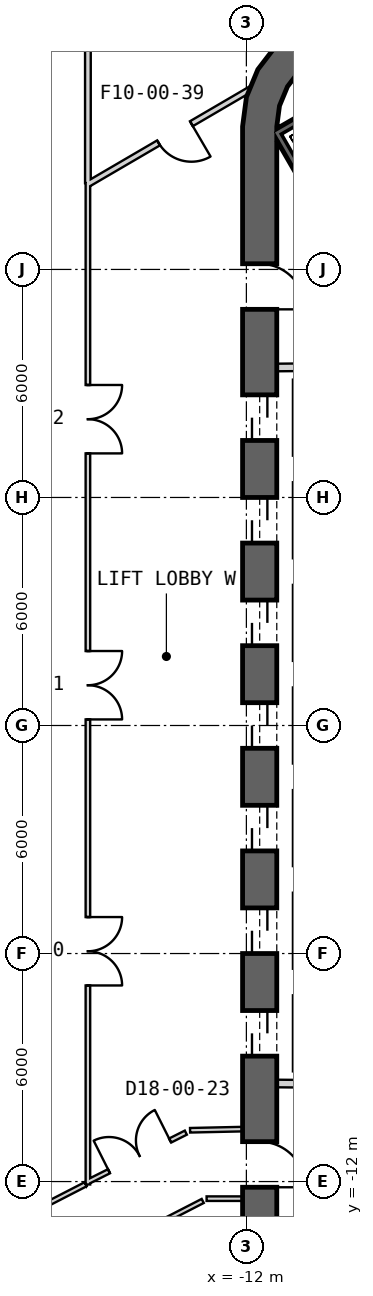
"""IFC4 building model, lengths in metres.
Left out: names, types, materials, properties, quantities, classifications, styles, units other than length and angle.
Written with IfcOpenShell. Run it as: python <this file> out.ifc"""

import sys

from ifc_helpers import new_model, si_unit, direction, frame, frame_2d, origin, place, context, subcontext, project, spatial, polyline, rectangle, outline, extrude, element, fill, save


model = new_model("IFC4")
c1 = context("Model", 3, precision=1e-05, world=origin(), true_north=direction((0.0, 1.0)))
c2 = subcontext(c1, "Body", "Model", "MODEL_VIEW")
j1 = project(units=[si_unit("LENGTHUNIT", "METRE"), si_unit("PLANEANGLEUNIT", "RADIAN")], contexts=[c1])
p1 = place(None, origin())
s1 = spatial("IfcSite", under=j1, at=p1, CompositionType="ELEMENT")
p2 = place(p1, origin())
s2 = spatial("IfcBuilding", under=s1, at=p2, CompositionType="ELEMENT")
p3 = place(p2, origin())
s3 = spatial("IfcBuildingStorey", under=s2, at=p3, CompositionType="ELEMENT", Elevation=0.0)
p4 = place(p3, frame((-11.65, 15.762, 0.0), z_axis=(0.0, 0.0, 1.0), x_axis=(0.0, -1.0, 0.0)))
e1 = element("IfcWall", 1, at=p4, inside=s3, PredefinedType="SHEAR", context=c2, shape_type="SweptSolid", body=[
    extrude(rectangle(XDim=31.523, YDim=0.9, at=frame_2d((15.762, 0.0))), origin(), (0.0, 0.0, 1.0), 9.0),
])
p5 = place(p4, frame((7.062, 0.0, 0.0)))
e2 = element("IfcOpeningElement", 2, at=p5, cuts=e1, PredefinedType="OPENING", context=c2, shape_type="SweptSolid", body=[
    extrude(rectangle(XDim=1.2, YDim=2.4, at=frame_2d((0.6, 1.2))), frame((0.0, 0.46, 0.0), z_axis=(0.0, -1.0, 0.0), x_axis=(1.0, 0.0, 0.0)), (0.0, 0.0, 1.0), 0.92),
])
p6 = place(p4, frame((9.762, 0.0, 0.0)))
e3 = element("IfcOpeningElement", 3, at=p6, cuts=e1, PredefinedType="OPENING", context=c2, shape_type="SweptSolid", body=[
    extrude(rectangle(XDim=1.2, YDim=2.4, at=frame_2d((0.6, 1.2))), frame((0.0, 0.46, 0.0), z_axis=(0.0, -1.0, 0.0), x_axis=(1.0, 0.0, 0.0)), (0.0, 0.0, 1.0), 0.92),
])
p7 = place(p4, frame((12.462, 0.0, 0.0)))
e4 = element("IfcOpeningElement", 4, at=p7, cuts=e1, PredefinedType="OPENING", context=c2, shape_type="SweptSolid", body=[
    extrude(rectangle(XDim=1.2, YDim=2.4, at=frame_2d((0.6, 1.2))), frame((0.0, 0.46, 0.0), z_axis=(0.0, -1.0, 0.0), x_axis=(1.0, 0.0, 0.0)), (0.0, 0.0, 1.0), 0.92),
])
p8 = place(p4, frame((15.162, 0.0, 0.0)))
e5 = element("IfcOpeningElement", 5, at=p8, cuts=e1, PredefinedType="OPENING", context=c2, shape_type="SweptSolid", body=[
    extrude(rectangle(XDim=1.2, YDim=2.4, at=frame_2d((0.6, 1.2))), frame((0.0, 0.46, 0.0), z_axis=(0.0, -1.0, 0.0), x_axis=(1.0, 0.0, 0.0)), (0.0, 0.0, 1.0), 0.92),
])
p9 = place(p4, frame((17.862, 0.0, 0.0)))
e6 = element("IfcOpeningElement", 6, at=p9, cuts=e1, PredefinedType="OPENING", context=c2, shape_type="SweptSolid", body=[
    extrude(rectangle(XDim=1.2, YDim=2.4, at=frame_2d((0.6, 1.2))), frame((0.0, 0.46, 0.0), z_axis=(0.0, -1.0, 0.0), x_axis=(1.0, 0.0, 0.0)), (0.0, 0.0, 1.0), 0.92),
])
p10 = place(p4, frame((20.562, 0.0, 0.0)))
e7 = element("IfcOpeningElement", 7, at=p10, cuts=e1, PredefinedType="OPENING", context=c2, shape_type="SweptSolid", body=[
    extrude(rectangle(XDim=1.2, YDim=2.4, at=frame_2d((0.6, 1.2))), frame((0.0, 0.46, 0.0), z_axis=(0.0, -1.0, 0.0), x_axis=(1.0, 0.0, 0.0)), (0.0, 0.0, 1.0), 0.92),
])
p11 = place(p4, frame((23.262, 0.0, 0.0)))
e8 = element("IfcOpeningElement", 8, at=p11, cuts=e1, PredefinedType="OPENING", context=c2, shape_type="SweptSolid", body=[
    extrude(rectangle(XDim=1.2, YDim=2.4, at=frame_2d((0.6, 1.2))), frame((0.0, 0.46, 0.0), z_axis=(0.0, -1.0, 0.0), x_axis=(1.0, 0.0, 0.0)), (0.0, 0.0, 1.0), 0.92),
])
p12 = place(p4, frame((3.612, 0.0, 0.0)))
e9 = element("IfcOpeningElement", 9, at=p12, cuts=e1, PredefinedType="OPENING", context=c2, shape_type="SweptSolid", body=[
    extrude(rectangle(XDim=1.2, YDim=2.4, at=frame_2d((0.6, 1.2))), frame((0.0, 0.46, 0.0), z_axis=(0.0, -1.0, 0.0), x_axis=(1.0, 0.0, 0.0)), (0.0, 0.0, 1.0), 0.92),
])
p13 = place(p4, frame((26.712, 0.0, 0.0)))
e10 = element("IfcOpeningElement", 10, at=p13, cuts=e1, PredefinedType="OPENING", context=c2, shape_type="SweptSolid", body=[
    extrude(rectangle(XDim=1.2, YDim=2.4, at=frame_2d((0.6, 1.2))), frame((0.0, 0.46, 0.0), z_axis=(0.0, -1.0, 0.0), x_axis=(1.0, 0.0, 0.0)), (0.0, 0.0, 1.0), 0.92),
])
p14 = place(p3, origin())
e11 = element("IfcWall", 11, at=p14, inside=s3, PredefinedType="SHEAR", context=c2, shape_type="SweptSolid", body=[
    extrude(outline(polyline([(-7.6, 18.36), (-8.323, 18.659), (-9.1, 18.762), (-9.876, 18.659), (-10.6, 18.36), (-11.221, 17.883), (-11.698, 17.262), (-11.998, 16.538), (-12.1, 15.762), (-11.2, 15.762), (-11.128, 16.305), (-10.919, 16.812), (-10.585, 17.247), (-10.15, 17.58), (-9.644, 17.79), (-9.1, 17.862), (-8.556, 17.79), (-8.05, 17.58), (-7.6, 18.36)])), origin(), (0.0, 0.0, 1.0), 9.0),
])
p15 = place(p3, frame((-11.2, 9.42, 0.0), z_axis=(0.0, 0.0, 1.0), x_axis=(0.999957167047, 0.009255488683, 0.0)))
e12 = element("IfcWall", 12, at=p15, inside=s3, PredefinedType="PLUMBINGWALL", context=c2, shape_type="SweptSolid", body=[
    extrude(rectangle(XDim=3.35, YDim=0.2, at=frame_2d((1.675, 0.0))), origin(), (0.0, 0.0, 1.0), 8.7),
])
p16 = place(p3, frame((-8.05, -9.449, 0.0), z_axis=(0.0, 0.0, 1.0), x_axis=(-0.999957467379, 0.009222983926, 0.0)))
e13 = element("IfcWall", 13, at=p16, inside=s3, PredefinedType="PLUMBINGWALL", context=c2, shape_type="SweptSolid", body=[
    extrude(rectangle(XDim=3.15, YDim=0.2, at=frame_2d((1.575, 0.0))), origin(), (0.0, 0.0, 1.0), 8.7),
])
p17 = place(p3, frame((-11.245, 15.678, -0.4), z_axis=(0.0, 0.0, 1.0), x_axis=(0.499977274689, -0.866038523851, 0.0)))
e14 = element("IfcWall", 14, at=p17, inside=s3, PredefinedType="SHEAR", context=c2, shape_type="SweptSolid", body=[
    extrude(rectangle(XDim=8.1, YDim=0.2, at=frame_2d((4.05, 0.0))), origin(), (0.0, 0.0, 1.0), 9.1),
])
p18 = place(p3, frame((-7.818, 17.541, -0.4), z_axis=(0.0, 0.0, 1.0), x_axis=(-0.866044365799, -0.499967155389, 0.0)))
e15 = element("IfcWall", 15, at=p18, inside=s3, PredefinedType="SHEAR", context=c2, shape_type="SweptSolid", body=[
    extrude(rectangle(XDim=3.8, YDim=0.2, at=frame_2d((1.9, 0.0))), origin(), (0.0, 0.0, 1.0), 9.1),
])
p19 = place(p3, frame((-7.196, -8.663, -0.4), z_axis=(0.0, 0.0, 1.0), x_axis=(-0.499997992926, -0.866026562566, 0.0)))
e16 = element("IfcWall", 16, at=p19, inside=s3, PredefinedType="SHEAR", context=c2, shape_type="SweptSolid", body=[
    extrude(rectangle(XDim=7.9, YDim=0.2, at=frame_2d((3.95, 0.0))), origin(), (0.0, 0.0, 1.0), 9.1),
])
p20 = place(p3, frame((-11.74, 16.832, 0.0), z_axis=(0.0, 0.0, 1.0), x_axis=(-0.863501067027, -0.504347010741, 0.0)))
e17 = element("IfcWall", 17, at=p20, inside=s3, PredefinedType="PLUMBINGWALL", context=c2, shape_type="SweptSolid", body=[
    extrude(rectangle(XDim=5.166, YDim=0.15, at=frame_2d((2.583, 0.0))), origin(), (0.0, 0.0, 1.0), 7.78),
])
p21 = place(p20, frame((1.977, 0.0, 0.0)))
e18 = element("IfcOpeningElement", 18, at=p21, cuts=e17, PredefinedType="OPENING", context=c2, shape_type="SweptSolid", body=[
    extrude(rectangle(XDim=1.0, YDim=2.1, at=frame_2d((0.5, 1.05))), frame((0.0, 0.085, 0.0), z_axis=(0.0, -1.0, 0.0), x_axis=(1.0, 0.0, 0.0)), (0.0, 0.0, 1.0), 0.17),
])
p22 = place(p3, frame((-13.481, -10.65, 0.0), z_axis=(0.0, 0.0, 1.0), x_axis=(0.999759933767, 0.021910610072, 0.0)))
e19 = element("IfcWall", 19, at=p22, inside=s3, PredefinedType="PARTITIONING", context=c2, shape_type="SweptSolid", body=[
    extrude(rectangle(XDim=1.382, YDim=0.12, at=frame_2d((0.691, 0.0))), origin(), (0.0, 0.0, 1.0), 8.7),
])
p23 = place(p3, frame((-16.2, -12.022, 0.0), z_axis=(0.0, 0.0, 1.0), x_axis=(0.893622341214, 0.448819686826, 0.0)))
e20 = element("IfcWall", 20, at=p23, inside=s3, PredefinedType="PARTITIONING", context=c2, shape_type="SweptSolid", body=[
    extrude(rectangle(XDim=2.917, YDim=0.12, at=frame_2d((1.458, 0.0))), origin(), (0.0, 0.0, 1.0), 8.7),
])
p24 = place(p23, frame((0.655, 0.0, 0.0)))
e21 = element("IfcOpeningElement", 21, at=p24, cuts=e20, PredefinedType="OPENING", context=c2, shape_type="SweptSolid", body=[
    extrude(rectangle(XDim=1.8, YDim=2.1, at=frame_2d((0.9, 1.05))), frame((0.0, 0.07, 0.0), z_axis=(0.0, -1.0, 0.0), x_axis=(1.0, 0.0, 0.0)), (0.0, 0.0, 1.0), 0.14),
])
p25 = place(p3, frame((-16.17, 14.273, 0.0), z_axis=(0.0, 0.0, 1.0), x_axis=(0.0, -1.0, 0.0)))
e22 = element("IfcWall", 22, at=p25, inside=s3, PredefinedType="PARTITIONING", context=c2, shape_type="SweptSolid", body=[
    extrude(rectangle(XDim=26.35, YDim=0.12, at=frame_2d((13.175, 0.0))), origin(), (0.0, 0.0, 1.0), 8.08),
])
p26 = place(p25, frame((19.314, 0.0, 0.0)))
e23 = element("IfcOpeningElement", 23, at=p26, cuts=e22, PredefinedType="OPENING", context=c2, shape_type="SweptSolid", body=[
    extrude(rectangle(XDim=1.8, YDim=2.1, at=frame_2d((0.9, 1.05))), frame((0.0, 0.07, 0.0), z_axis=(0.0, -1.0, 0.0), x_axis=(1.0, 0.0, 0.0)), (0.0, 0.0, 1.0), 0.14),
])
p27 = place(p25, frame((12.314, 0.0, 0.0)))
e24 = element("IfcOpeningElement", 24, at=p27, cuts=e22, PredefinedType="OPENING", context=c2, shape_type="SweptSolid", body=[
    extrude(rectangle(XDim=1.8, YDim=2.1, at=frame_2d((0.9, 1.05))), frame((0.0, 0.07, 0.0), z_axis=(0.0, -1.0, 0.0), x_axis=(1.0, 0.0, 0.0)), (0.0, 0.0, 1.0), 0.14),
])
p28 = place(p25, frame((5.314, 0.0, 0.0)))
e25 = element("IfcOpeningElement", 25, at=p28, cuts=e22, PredefinedType="OPENING", context=c2, shape_type="SweptSolid", body=[
    extrude(rectangle(XDim=1.8, YDim=2.1, at=frame_2d((0.9, 1.05))), frame((0.0, 0.07, 0.0), z_axis=(0.0, -1.0, 0.0), x_axis=(1.0, 0.0, 0.0)), (0.0, 0.0, 1.0), 0.14),
])
p29 = place(p3, frame((-16.17, 14.273, 0.0), z_axis=(0.0, 0.0, 1.0), x_axis=(0.0, 1.0, 0.0)))
e26 = element("IfcWall", 26, at=p29, inside=s3, PredefinedType="PLUMBINGWALL", context=c2, shape_type="SweptSolid", body=[
    extrude(rectangle(XDim=5.521, YDim=0.15, at=frame_2d((2.761, 0.0))), origin(), (0.0, 0.0, 1.0), 7.88),
])
p30 = place(p3, frame((-16.23, -12.071, 0.0), z_axis=(0.0, 0.0, 1.0), x_axis=(-0.889183605382, -0.457550561053, 0.0)))
e27 = element("IfcWall", 27, at=p30, inside=s3, PredefinedType="PARTITIONING", context=c2, shape_type="SweptSolid", body=[
    extrude(rectangle(XDim=6.999, YDim=0.12, at=frame_2d((3.5, 0.0))), origin(), (0.0, 0.0, 1.0), 8.7),
])
p31 = place(p30, frame((2.499, 0.0, 0.0)))
e28 = element("IfcOpeningElement", 28, at=p31, cuts=e27, PredefinedType="OPENING", context=c2, shape_type="SweptSolid", body=[
    extrude(rectangle(XDim=1.8, YDim=2.1, at=frame_2d((0.9, 1.05))), frame((0.0, 0.07, 0.0), z_axis=(0.0, -1.0, 0.0), x_axis=(1.0, 0.0, 0.0)), (0.0, 0.0, 1.0), 0.14),
])
p32 = place(p3, frame((-12.07, -12.45, 0.0), z_axis=(0.0, 0.0, 1.0), x_axis=(-1.0, 0.0, 0.0)))
e29 = element("IfcWall", 29, at=p32, inside=s3, PredefinedType="PARTITIONING", context=c2, shape_type="SweptSolid", body=[
    extrude(rectangle(XDim=0.977, YDim=0.12, at=frame_2d((0.488, 0.0))), origin(), (0.0, 0.0, 1.0), 7.88),
])
p33 = place(p3, frame((-24.302, -18.249, 0.0), z_axis=(0.0, 0.0, 1.0), x_axis=(0.889186002608, 0.45754590236, 0.0)))
e30 = element("IfcWall", 30, at=p33, inside=s3, PredefinedType="PARTITIONING", context=c2, shape_type="SweptSolid", body=[
    extrude(rectangle(XDim=12.543, YDim=0.12, at=frame_2d((6.272, 0.0))), origin(), (0.0, 0.0, 1.0), 7.88),
])
p34 = place(p33, frame((5.375, 0.0, 0.0)))
e31 = element("IfcOpeningElement", 31, at=p34, cuts=e30, PredefinedType="OPENING", context=c2, shape_type="SweptSolid", body=[
    extrude(rectangle(XDim=1.8, YDim=2.1, at=frame_2d((0.9, 1.05))), frame((0.0, 0.07, 0.0), z_axis=(0.0, -1.0, 0.0), x_axis=(1.0, 0.0, 0.0)), (0.0, 0.0, 1.0), 0.14),
])
p35 = place(p24, origin())
e32 = element("IfcDoor", 32, at=p35, inside=s3, OperationType="DOUBLE_DOOR_SINGLE_SWING", PredefinedType="NOTDEFINED", context=c2, shape_type="SweptSolid", body=[
    extrude(rectangle(XDim=1.8, YDim=2.1, at=frame_2d((0.9, 1.05))), frame((0.0, 0.025, 0.0), z_axis=(0.0, -1.0, 0.0), x_axis=(1.0, 0.0, 0.0)), (0.0, 0.0, 1.0), 0.05),
])
fill(e21, e32)
p36 = place(p26, origin())
e33 = element("IfcDoor", 33, at=p36, inside=s3, OperationType="DOUBLE_DOOR_SINGLE_SWING", PredefinedType="NOTDEFINED", context=c2, shape_type="SweptSolid", body=[
    extrude(rectangle(XDim=1.8, YDim=2.1, at=frame_2d((0.9, 1.05))), frame((0.0, 0.025, 0.0), z_axis=(0.0, -1.0, 0.0), x_axis=(1.0, 0.0, 0.0)), (0.0, 0.0, 1.0), 0.05),
])
fill(e23, e33)
p37 = place(p27, origin())
e34 = element("IfcDoor", 34, at=p37, inside=s3, OperationType="DOUBLE_DOOR_SINGLE_SWING", PredefinedType="NOTDEFINED", context=c2, shape_type="SweptSolid", body=[
    extrude(rectangle(XDim=1.8, YDim=2.1, at=frame_2d((0.9, 1.05))), frame((0.0, 0.025, 0.0), z_axis=(0.0, -1.0, 0.0), x_axis=(1.0, 0.0, 0.0)), (0.0, 0.0, 1.0), 0.05),
])
fill(e24, e34)
p38 = place(p28, origin())
e35 = element("IfcDoor", 35, at=p38, inside=s3, OperationType="DOUBLE_DOOR_SINGLE_SWING", PredefinedType="NOTDEFINED", context=c2, shape_type="SweptSolid", body=[
    extrude(rectangle(XDim=1.8, YDim=2.1, at=frame_2d((0.9, 1.05))), frame((0.0, 0.025, 0.0), z_axis=(0.0, -1.0, 0.0), x_axis=(1.0, 0.0, 0.0)), (0.0, 0.0, 1.0), 0.05),
])
fill(e25, e35)
p39 = place(p21, origin())
e36 = element("IfcDoor", 36, at=p39, inside=s3, OperationType="SINGLE_SWING_LEFT", PredefinedType="USERDEFINED", context=c2, shape_type="SweptSolid", body=[
    extrude(rectangle(XDim=1.0, YDim=2.1, at=frame_2d((0.5, 1.05))), frame((0.0, 0.025, 0.0), z_axis=(0.0, -1.0, 0.0), x_axis=(1.0, 0.0, 0.0)), (0.0, 0.0, 1.0), 0.05),
])
fill(e18, e36)
p40 = place(p5, origin())
e37 = element("IfcDoor", 37, at=p40, inside=s3, OperationType="SLIDING_TO_LEFT", PredefinedType="USERDEFINED", context=c2, shape_type="SweptSolid", body=[
    extrude(rectangle(XDim=1.2, YDim=2.4, at=frame_2d((0.6, 1.2))), frame((0.0, 0.025, 0.0), z_axis=(0.0, -1.0, 0.0), x_axis=(1.0, 0.0, 0.0)), (0.0, 0.0, 1.0), 0.05),
])
fill(e2, e37)
p41 = place(p6, origin())
e38 = element("IfcDoor", 38, at=p41, inside=s3, OperationType="SLIDING_TO_LEFT", PredefinedType="USERDEFINED", context=c2, shape_type="SweptSolid", body=[
    extrude(rectangle(XDim=1.2, YDim=2.4, at=frame_2d((0.6, 1.2))), frame((0.0, 0.025, 0.0), z_axis=(0.0, -1.0, 0.0), x_axis=(1.0, 0.0, 0.0)), (0.0, 0.0, 1.0), 0.05),
])
fill(e3, e38)
p42 = place(p7, origin())
e39 = element("IfcDoor", 39, at=p42, inside=s3, OperationType="SLIDING_TO_LEFT", PredefinedType="USERDEFINED", context=c2, shape_type="SweptSolid", body=[
    extrude(rectangle(XDim=1.2, YDim=2.4, at=frame_2d((0.6, 1.2))), frame((0.0, 0.025, 0.0), z_axis=(0.0, -1.0, 0.0), x_axis=(1.0, 0.0, 0.0)), (0.0, 0.0, 1.0), 0.05),
])
fill(e4, e39)
p43 = place(p8, origin())
e40 = element("IfcDoor", 40, at=p43, inside=s3, OperationType="SLIDING_TO_LEFT", PredefinedType="USERDEFINED", context=c2, shape_type="SweptSolid", body=[
    extrude(rectangle(XDim=1.2, YDim=2.4, at=frame_2d((0.6, 1.2))), frame((0.0, 0.025, 0.0), z_axis=(0.0, -1.0, 0.0), x_axis=(1.0, 0.0, 0.0)), (0.0, 0.0, 1.0), 0.05),
])
fill(e5, e40)
p44 = place(p9, origin())
e41 = element("IfcDoor", 41, at=p44, inside=s3, OperationType="SLIDING_TO_LEFT", PredefinedType="USERDEFINED", context=c2, shape_type="SweptSolid", body=[
    extrude(rectangle(XDim=1.2, YDim=2.4, at=frame_2d((0.6, 1.2))), frame((0.0, 0.025, 0.0), z_axis=(0.0, -1.0, 0.0), x_axis=(1.0, 0.0, 0.0)), (0.0, 0.0, 1.0), 0.05),
])
fill(e6, e41)
p45 = place(p10, origin())
e42 = element("IfcDoor", 42, at=p45, inside=s3, OperationType="SLIDING_TO_LEFT", PredefinedType="USERDEFINED", context=c2, shape_type="SweptSolid", body=[
    extrude(rectangle(XDim=1.2, YDim=2.4, at=frame_2d((0.6, 1.2))), frame((0.0, 0.025, 0.0), z_axis=(0.0, -1.0, 0.0), x_axis=(1.0, 0.0, 0.0)), (0.0, 0.0, 1.0), 0.05),
])
fill(e7, e42)
p46 = place(p11, origin())
e43 = element("IfcDoor", 43, at=p46, inside=s3, OperationType="SLIDING_TO_LEFT", PredefinedType="USERDEFINED", context=c2, shape_type="SweptSolid", body=[
    extrude(rectangle(XDim=1.2, YDim=2.4, at=frame_2d((0.6, 1.2))), frame((0.0, 0.025, 0.0), z_axis=(0.0, -1.0, 0.0), x_axis=(1.0, 0.0, 0.0)), (0.0, 0.0, 1.0), 0.05),
])
fill(e8, e43)
p47 = place(p12, origin())
e44 = element("IfcDoor", 44, at=p47, inside=s3, OperationType="SINGLE_SWING_RIGHT", PredefinedType="USERDEFINED", context=c2, shape_type="SweptSolid", body=[
    extrude(rectangle(XDim=1.2, YDim=2.4, at=frame_2d((0.6, 1.2))), frame((0.0, 0.025, 0.0), z_axis=(0.0, -1.0, 0.0), x_axis=(1.0, 0.0, 0.0)), (0.0, 0.0, 1.0), 0.05),
])
fill(e9, e44)
p48 = place(p13, origin())
e45 = element("IfcDoor", 45, at=p48, inside=s3, OperationType="SINGLE_SWING_RIGHT", PredefinedType="USERDEFINED", context=c2, shape_type="SweptSolid", body=[
    extrude(rectangle(XDim=1.2, YDim=2.4, at=frame_2d((0.6, 1.2))), frame((0.0, 0.025, 0.0), z_axis=(0.0, -1.0, 0.0), x_axis=(1.0, 0.0, 0.0)), (0.0, 0.0, 1.0), 0.05),
])
fill(e10, e45)
save(model, sys.argv[1])
